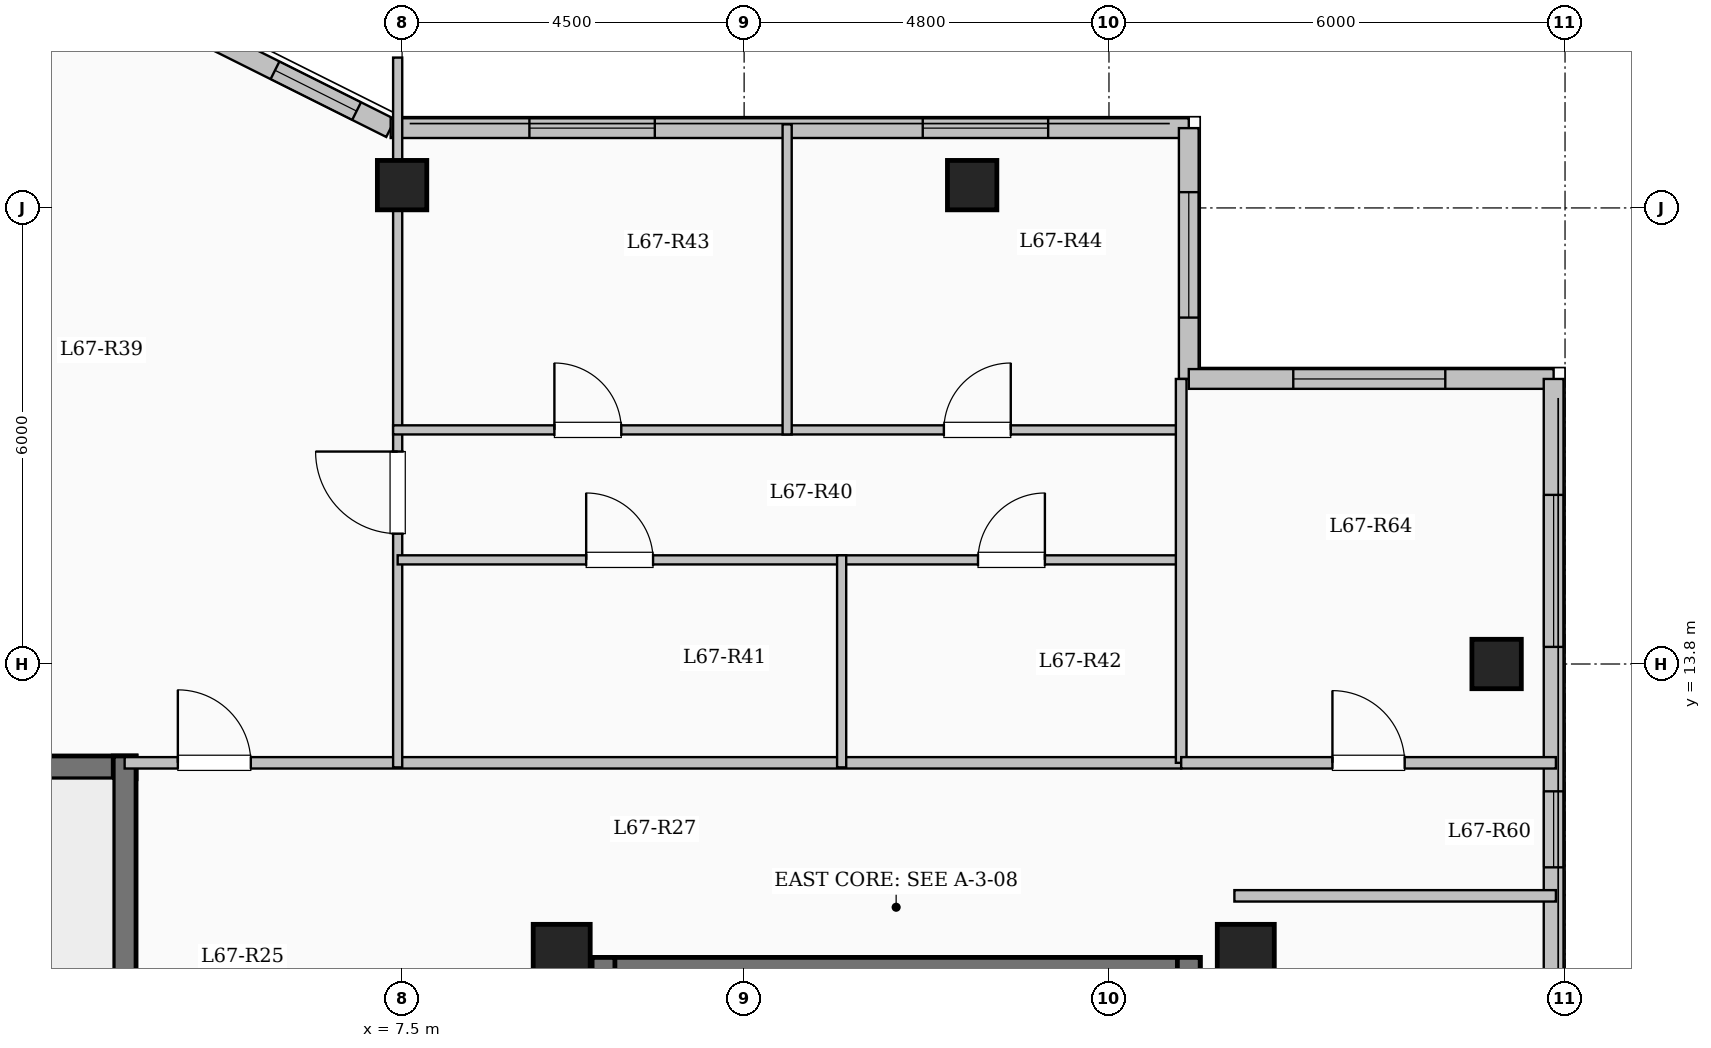
"""IFC4 building model, lengths in metres.
Left out: names, types, materials, properties, quantities, classifications, styles, units other than length and angle.
Written with IfcOpenShell. Run it as: python <this file> out.ifc"""

import sys

from ifc_helpers import new_model, si_unit, direction, frame, frame_2d, origin, origin_2d, place, context, subcontext, project, spatial, rectangle, extrude, element, fill, save


model = new_model("IFC4")
c1 = context("Model", 3, precision=1e-05, world=origin(), true_north=direction((0.0, 1.0)))
c2 = subcontext(c1, "Body", "Model", "MODEL_VIEW")
j1 = project(units=[si_unit("LENGTHUNIT", "METRE"), si_unit("PLANEANGLEUNIT", "RADIAN")], contexts=[c1])
p1 = place(None, origin())
s1 = spatial("IfcSite", under=j1, at=p1, CompositionType="ELEMENT")
p2 = place(p1, origin())
s2 = spatial("IfcBuilding", under=s1, at=p2, CompositionType="ELEMENT")
p3 = place(p2, frame((0.0, 0.0, 248.2)))
s3 = spatial("IfcBuildingStorey", under=s2, at=p3, CompositionType="ELEMENT", Elevation=248.2)
for number, where, z_axis, x_axis in (
    (1, (9.6, 10.0, 0.0), (0.0, 0.0, 1.0), (1.0, 0.0, 0.0)),
    (2, (18.6, 10.0, 0.0), (0.0, 0.0, 1.0), (1.0, 0.0, 0.0)),
):
    element("IfcColumn", number, at=place(p3, frame(where, z_axis=z_axis, x_axis=x_axis)), inside=s3, PredefinedType="COLUMN", context=c2, shape_type="SweptSolid", body=[
        extrude(rectangle(XDim=0.75, YDim=0.75, at=origin_2d()), origin(), (0.0, 0.0, 1.0), 3.35),
    ])
for number, where, z_axis, x_axis in (
    (3, (7.5, 20.1, 0.0), (0.0, 0.0, 1.0), (1.0, 0.0, 0.0)),
    (4, (15.0, 20.1, 0.0), (0.0, 0.0, 1.0), (1.0, 0.0, 0.0)),
    (5, (21.9, 13.8, 0.0), (0.0, 0.0, 1.0), (1.0, 0.0, 0.0)),
):
    element("IfcColumn", number, at=place(p3, frame(where, z_axis=z_axis, x_axis=x_axis)), inside=s3, PredefinedType="COLUMN", context=c2, shape_type="SweptSolid", body=[
        extrude(rectangle(XDim=0.65, YDim=0.65, at=origin_2d()), origin(), (0.0, 0.0, 1.0), 3.35),
    ])
p4 = place(p3, frame((4.35, 22.35, 0.0), z_axis=(0.0, 0.0, 1.0), x_axis=(0.894427191, -0.4472135955, 0.0)))
e6 = element("IfcWall", 6, at=p4, inside=s3, PredefinedType="SOLIDWALL", context=c2, shape_type="SweptSolid", body=[
    extrude(rectangle(XDim=3.354, YDim=0.26, at=frame_2d((1.677, 0.0))), origin(), (0.0, 0.0, 1.0), 3.1),
])
p5 = place(p4, frame((1.653, 0.0, 0.95)))
e7 = element("IfcOpeningElement", 7, at=p5, cuts=e6, PredefinedType="OPENING", context=c2, shape_type="SweptSolid", body=[
    extrude(rectangle(XDim=1.2, YDim=1.5, at=frame_2d((0.6, 0.75))), frame((0.0, 0.14, 0.0), z_axis=(0.0, -1.0, 0.0), x_axis=(1.0, 0.0, 0.0)), (0.0, 0.0, 1.0), 0.28),
])
p6 = place(p3, frame((7.35, 20.85, 0.0), z_axis=(0.0, 0.0, 1.0), x_axis=(1.0, 0.0, 0.0)))
e8 = element("IfcWall", 8, at=p6, inside=s3, PredefinedType="SOLIDWALL", context=c2, shape_type="SweptSolid", body=[
    extrude(rectangle(XDim=10.5, YDim=0.26, at=frame_2d((5.25, 0.0))), origin(), (0.0, 0.0, 1.0), 3.1),
])
p7 = place(p6, frame((1.825, 0.0, 0.9)))
e9 = element("IfcOpeningElement", 9, at=p7, cuts=e8, PredefinedType="OPENING", context=c2, shape_type="SweptSolid", body=[
    extrude(rectangle(XDim=1.65, YDim=1.6, at=frame_2d((0.825, 0.8))), frame((0.0, 0.14, 0.0), z_axis=(0.0, -1.0, 0.0), x_axis=(1.0, 0.0, 0.0)), (0.0, 0.0, 1.0), 0.28),
])
p8 = place(p6, frame((7.0, 0.0, 0.9)))
e10 = element("IfcOpeningElement", 10, at=p8, cuts=e8, PredefinedType="OPENING", context=c2, shape_type="SweptSolid", body=[
    extrude(rectangle(XDim=1.65, YDim=1.6, at=frame_2d((0.825, 0.8))), frame((0.0, 0.14, 0.0), z_axis=(0.0, -1.0, 0.0), x_axis=(1.0, 0.0, 0.0)), (0.0, 0.0, 1.0), 0.28),
])
p9 = place(p3, frame((17.85, 20.85, 0.0), z_axis=(0.0, 0.0, 1.0), x_axis=(0.0, -1.0, 0.0)))
e11 = element("IfcWall", 11, at=p9, inside=s3, PredefinedType="SOLIDWALL", context=c2, shape_type="SweptSolid", body=[
    extrude(rectangle(XDim=3.3, YDim=0.26, at=frame_2d((1.65, 0.0))), origin(), (0.0, 0.0, 1.0), 3.1),
])
p10 = place(p9, frame((0.843, 0.0, 0.9)))
e12 = element("IfcOpeningElement", 12, at=p10, cuts=e11, PredefinedType="OPENING", context=c2, shape_type="SweptSolid", body=[
    extrude(rectangle(XDim=1.65, YDim=1.6, at=frame_2d((0.825, 0.8))), frame((0.0, 0.14, 0.0), z_axis=(0.0, -1.0, 0.0), x_axis=(1.0, 0.0, 0.0)), (0.0, 0.0, 1.0), 0.28),
])
p11 = place(p3, frame((17.85, 17.55, 0.0), z_axis=(0.0, 0.0, 1.0), x_axis=(1.0, 0.0, 0.0)))
e13 = element("IfcWall", 13, at=p11, inside=s3, PredefinedType="SOLIDWALL", context=c2, shape_type="SweptSolid", body=[
    extrude(rectangle(XDim=4.8, YDim=0.26, at=frame_2d((2.4, 0.0))), origin(), (0.0, 0.0, 1.0), 3.1),
])
p12 = place(p11, frame((1.375, 0.0, 0.9)))
e14 = element("IfcOpeningElement", 14, at=p12, cuts=e13, PredefinedType="OPENING", context=c2, shape_type="SweptSolid", body=[
    extrude(rectangle(XDim=2.0, YDim=1.7, at=frame_2d((1.0, 0.85))), frame((0.0, 0.14, 0.0), z_axis=(0.0, -1.0, 0.0), x_axis=(1.0, 0.0, 0.0)), (0.0, 0.0, 1.0), 0.28),
])
p13 = place(p3, frame((22.65, 17.55, 0.0), z_axis=(0.0, 0.0, 1.0), x_axis=(0.0, -1.0, 0.0)))
e15 = element("IfcWall", 15, at=p13, inside=s3, PredefinedType="SOLIDWALL", context=c2, shape_type="SweptSolid", body=[
    extrude(rectangle(XDim=35.1, YDim=0.26, at=frame_2d((17.55, 0.0))), origin(), (0.0, 0.0, 1.0), 3.1),
])
p14 = place(p13, frame((1.525, 0.0, 0.9)))
e16 = element("IfcOpeningElement", 16, at=p14, cuts=e15, PredefinedType="OPENING", context=c2, shape_type="SweptSolid", body=[
    extrude(rectangle(XDim=2.0, YDim=1.7, at=frame_2d((1.0, 0.85))), frame((0.0, 0.14, 0.0), z_axis=(0.0, -1.0, 0.0), x_axis=(1.0, 0.0, 0.0)), (0.0, 0.0, 1.0), 0.28),
])
p15 = place(p13, frame((5.425, 0.0, 0.95)))
e17 = element("IfcOpeningElement", 17, at=p15, cuts=e15, PredefinedType="OPENING", context=c2, shape_type="SweptSolid", body=[
    extrude(rectangle(XDim=1.0, YDim=1.5, at=frame_2d((0.5, 0.75))), frame((0.0, 0.14, 0.0), z_axis=(0.0, -1.0, 0.0), x_axis=(1.0, 0.0, 0.0)), (0.0, 0.0, 1.0), 0.28),
])
p16 = place(p13, frame((14.8, 0.0, 0.9)))
e18 = element("IfcOpeningElement", 18, at=p16, cuts=e15, PredefinedType="OPENING", context=c2, shape_type="SweptSolid", body=[
    extrude(rectangle(XDim=2.0, YDim=1.7, at=frame_2d((1.0, 0.85))), frame((0.0, 0.14, 0.0), z_axis=(0.0, -1.0, 0.0), x_axis=(1.0, 0.0, 0.0)), (0.0, 0.0, 1.0), 0.28),
])
p17 = place(p13, frame((25.275, 0.0, 0.95)))
e19 = element("IfcOpeningElement", 19, at=p17, cuts=e15, PredefinedType="OPENING", context=c2, shape_type="SweptSolid", body=[
    extrude(rectangle(XDim=1.2, YDim=1.5, at=frame_2d((0.6, 0.75))), frame((0.0, 0.14, 0.0), z_axis=(0.0, -1.0, 0.0), x_axis=(1.0, 0.0, 0.0)), (0.0, 0.0, 1.0), 0.28),
])
p18 = place(p13, frame((29.925, 0.0, 0.9)))
e20 = element("IfcOpeningElement", 20, at=p18, cuts=e15, PredefinedType="OPENING", context=c2, shape_type="SweptSolid", body=[
    extrude(rectangle(XDim=2.2, YDim=1.75, at=frame_2d((1.1, 0.875))), frame((0.0, 0.14, 0.0), z_axis=(0.0, -1.0, 0.0), x_axis=(1.0, 0.0, 0.0)), (0.0, 0.0, 1.0), 0.28),
])
p19 = place(p3, frame((10.0, 9.79, 0.0), z_axis=(0.0, 0.0, 1.0), x_axis=(1.0, 0.0, 0.0)))
e21 = element("IfcWall", 21, at=p19, inside=s3, PredefinedType="SHEAR", context=c2, shape_type="SweptSolid", body=[
    extrude(rectangle(XDim=8.0, YDim=0.3, at=frame_2d((4.0, 0.0))), origin(), (0.0, 0.0, 1.0), 3.35),
])
for number, where, z_axis, x_axis in (
    (22, (10.15, 6.35, 0.0), (0.0, 0.0, 1.0), (0.0, 1.0, 0.0)),
    (23, (17.85, 6.35, 0.0), (0.0, 0.0, 1.0), (0.0, 1.0, 0.0)),
):
    element("IfcWall", number, at=place(p3, frame(where, z_axis=z_axis, x_axis=x_axis)), inside=s3, PredefinedType="SHEAR", context=c2, shape_type="SweptSolid", body=[
        extrude(rectangle(XDim=3.59, YDim=0.3, at=frame_2d((1.795, 0.0))), origin(), (0.0, 0.0, 1.0), 3.35),
    ])
p20 = place(p3, frame((-4.0, 12.44, 0.0), z_axis=(0.0, 0.0, 1.0), x_axis=(1.0, 0.0, 0.0)))
e24 = element("IfcWall", 24, at=p20, inside=s3, PredefinedType="SHEAR", context=c2, shape_type="SweptSolid", body=[
    extrude(rectangle(XDim=8.0, YDim=0.3, at=frame_2d((4.0, 0.0))), origin(), (0.0, 0.0, 1.0), 3.35),
])
p21 = place(p3, frame((3.85, 9.0, 0.0), z_axis=(0.0, 0.0, 1.0), x_axis=(0.0, 1.0, 0.0)))
e25 = element("IfcWall", 25, at=p21, inside=s3, PredefinedType="SHEAR", context=c2, shape_type="SweptSolid", body=[
    extrude(rectangle(XDim=3.59, YDim=0.3, at=frame_2d((1.795, 0.0))), origin(), (0.0, 0.0, 1.0), 3.35),
])
p22 = place(p3, frame((3.85, 12.5, 0.0), z_axis=(0.0, 0.0, 1.0), x_axis=(1.0, 0.0, 0.0)))
e26 = element("IfcWall", 26, at=p22, inside=s3, PredefinedType="PARTITIONING", context=c2, shape_type="SweptSolid", body=[
    extrude(rectangle(XDim=13.9, YDim=0.15, at=frame_2d((6.95, 0.0))), origin(), (0.0, 0.0, 1.0), 3.1),
])
p23 = place(p22, frame((0.7, 0.0, 0.0)))
e27 = element("IfcOpeningElement", 27, at=p23, cuts=e26, PredefinedType="OPENING", context=c2, shape_type="SweptSolid", body=[
    extrude(rectangle(XDim=0.96, YDim=2.15, at=frame_2d((0.48, 1.075))), frame((0.0, 0.085, 0.0), z_axis=(0.0, -1.0, 0.0), x_axis=(1.0, 0.0, 0.0)), (0.0, 0.0, 1.0), 0.17),
])
p24 = place(p3, frame((7.442, 12.44, 0.0), z_axis=(0.0, 0.0, 1.0), x_axis=(0.0, 1.0, 0.0)))
e28 = element("IfcWall", 28, at=p24, inside=s3, PredefinedType="PARTITIONING", context=c2, shape_type="SweptSolid", body=[
    extrude(rectangle(XDim=9.338, YDim=0.12, at=frame_2d((4.669, 0.0))), origin(), (0.0, 0.0, 1.0), 2.685),
])
p25 = place(p24, frame((3.075, 0.0, 0.0)))
e29 = element("IfcOpeningElement", 29, at=p25, cuts=e28, PredefinedType="OPENING", context=c2, shape_type="SweptSolid", body=[
    extrude(rectangle(XDim=1.08, YDim=2.15, at=frame_2d((0.54, 1.075))), frame((0.0, 0.07, 0.0), z_axis=(0.0, -1.0, 0.0), x_axis=(1.0, 0.0, 0.0)), (0.0, 0.0, 1.0), 0.14),
])
p26 = place(p3, frame((7.442, 15.17, 0.0), z_axis=(0.0, 0.0, 1.0), x_axis=(1.0, 0.0, 0.0)))
e30 = element("IfcWall", 30, at=p26, inside=s3, PredefinedType="PARTITIONING", context=c2, shape_type="SweptSolid", body=[
    extrude(rectangle(XDim=5.841, YDim=0.12, at=frame_2d((2.92, 0.0))), origin(), (0.0, 0.0, 1.0), 3.1),
])
p27 = place(p26, frame((2.48, 0.0, 0.0)))
e31 = element("IfcOpeningElement", 31, at=p27, cuts=e30, PredefinedType="OPENING", context=c2, shape_type="SweptSolid", body=[
    extrude(rectangle(XDim=0.88, YDim=2.1, at=frame_2d((0.44, 1.05))), frame((0.0, 0.07, 0.0), z_axis=(0.0, -1.0, 0.0), x_axis=(1.0, 0.0, 0.0)), (0.0, 0.0, 1.0), 0.14),
])
p28 = place(p3, frame((13.283, 15.17, 0.0), z_axis=(0.0, 0.0, 1.0), x_axis=(1.0, 0.0, 0.0)))
e32 = element("IfcWall", 32, at=p28, inside=s3, PredefinedType="PARTITIONING", context=c2, shape_type="SweptSolid", body=[
    extrude(rectangle(XDim=4.467, YDim=0.12, at=frame_2d((2.233, 0.0))), origin(), (0.0, 0.0, 1.0), 3.1),
])
p29 = place(p28, frame((1.794, 0.0, 0.0)))
e33 = element("IfcOpeningElement", 33, at=p29, cuts=e32, PredefinedType="OPENING", context=c2, shape_type="SweptSolid", body=[
    extrude(rectangle(XDim=0.88, YDim=2.1, at=frame_2d((0.44, 1.05))), frame((0.0, 0.07, 0.0), z_axis=(0.0, -1.0, 0.0), x_axis=(1.0, 0.0, 0.0)), (0.0, 0.0, 1.0), 0.14),
])
p30 = place(p3, frame((7.382, 16.88, 0.0), z_axis=(0.0, 0.0, 1.0), x_axis=(1.0, 0.0, 0.0)))
e34 = element("IfcWall", 34, at=p30, inside=s3, PredefinedType="PARTITIONING", context=c2, shape_type="SweptSolid", body=[
    extrude(rectangle(XDim=10.428, YDim=0.12, at=frame_2d((5.214, 0.0))), origin(), (0.0, 0.0, 1.0), 2.785),
])
p31 = place(p30, frame((2.122, 0.0, 0.0)))
e35 = element("IfcOpeningElement", 35, at=p31, cuts=e34, PredefinedType="OPENING", context=c2, shape_type="SweptSolid", body=[
    extrude(rectangle(XDim=0.88, YDim=2.1, at=frame_2d((0.44, 1.05))), frame((0.0, 0.07, 0.0), z_axis=(0.0, -1.0, 0.0), x_axis=(1.0, 0.0, 0.0)), (0.0, 0.0, 1.0), 0.14),
])
p32 = place(p30, frame((7.246, 0.0, 0.0)))
e36 = element("IfcOpeningElement", 36, at=p32, cuts=e34, PredefinedType="OPENING", context=c2, shape_type="SweptSolid", body=[
    extrude(rectangle(XDim=0.88, YDim=2.1, at=frame_2d((0.44, 1.05))), frame((0.0, 0.07, 0.0), z_axis=(0.0, -1.0, 0.0), x_axis=(1.0, 0.0, 0.0)), (0.0, 0.0, 1.0), 0.14),
])
p33 = place(p3, frame((13.283, 12.44, 0.0), z_axis=(0.0, 0.0, 1.0), x_axis=(0.0, 1.0, 0.0)))
e37 = element("IfcWall", 37, at=p33, inside=s3, PredefinedType="PARTITIONING", context=c2, shape_type="SweptSolid", body=[
    extrude(rectangle(XDim=2.79, YDim=0.12, at=frame_2d((1.395, 0.0))), origin(), (0.0, 0.0, 1.0), 3.1),
])
p34 = place(p3, frame((12.566, 16.82, 0.0), z_axis=(0.0, 0.0, 1.0), x_axis=(0.0, 1.0, 0.0)))
e38 = element("IfcWall", 38, at=p34, inside=s3, PredefinedType="PARTITIONING", context=c2, shape_type="SweptSolid", body=[
    extrude(rectangle(XDim=4.08, YDim=0.12, at=frame_2d((2.04, 0.0))), origin(), (0.0, 0.0, 1.0), 3.1),
])
p35 = place(p3, frame((18.45, 10.75, 0.0), z_axis=(0.0, 0.0, 1.0), x_axis=(1.0, 0.0, 0.0)))
e39 = element("IfcWall", 39, at=p35, inside=s3, PredefinedType="PARTITIONING", context=c2, shape_type="SweptSolid", body=[
    extrude(rectangle(XDim=4.23, YDim=0.15, at=frame_2d((2.115, 0.0))), origin(), (0.0, 0.0, 1.0), 3.1),
])
p36 = place(p3, frame((17.75, 12.5, 0.0), z_axis=(0.0, 0.0, 1.0), x_axis=(0.0, 1.0, 0.0)))
e40 = element("IfcWall", 40, at=p36, inside=s3, PredefinedType="PARTITIONING", context=c2, shape_type="SweptSolid", body=[
    extrude(rectangle(XDim=5.05, YDim=0.14, at=frame_2d((2.525, 0.0))), origin(), (0.0, 0.0, 1.0), 3.1),
])
p37 = place(p3, frame((17.75, 12.5, 0.0), z_axis=(0.0, 0.0, 1.0), x_axis=(1.0, 0.0, 0.0)))
e41 = element("IfcWall", 41, at=p37, inside=s3, PredefinedType="PARTITIONING", context=c2, shape_type="SweptSolid", body=[
    extrude(rectangle(XDim=4.93, YDim=0.15, at=frame_2d((2.465, 0.0))), origin(), (0.0, 0.0, 1.0), 3.1),
])
p38 = place(p37, frame((1.99, 0.0, 0.0)))
e42 = element("IfcOpeningElement", 42, at=p38, cuts=e41, PredefinedType="OPENING", context=c2, shape_type="SweptSolid", body=[
    extrude(rectangle(XDim=0.95, YDim=2.15, at=frame_2d((0.475, 1.075))), frame((0.0, 0.085, 0.0), z_axis=(0.0, -1.0, 0.0), x_axis=(1.0, 0.0, 0.0)), (0.0, 0.0, 1.0), 0.17),
])
p39 = place(p5, origin())
e43 = element("IfcWindow", 43, at=p39, inside=s3, PartitioningType="SINGLE_PANEL", PredefinedType="WINDOW", context=c2, shape_type="SweptSolid", body=[
    extrude(rectangle(XDim=1.2, YDim=1.5, at=frame_2d((0.6, 0.75))), frame((0.0, 0.03, 0.0), z_axis=(0.0, -1.0, 0.0), x_axis=(1.0, 0.0, 0.0)), (0.0, 0.0, 1.0), 0.06),
])
fill(e7, e43)
p40 = place(p7, origin())
e44 = element("IfcWindow", 44, at=p40, inside=s3, PartitioningType="SINGLE_PANEL", PredefinedType="WINDOW", context=c2, shape_type="SweptSolid", body=[
    extrude(rectangle(XDim=1.65, YDim=1.6, at=frame_2d((0.825, 0.8))), frame((0.0, 0.03, 0.0), z_axis=(0.0, -1.0, 0.0), x_axis=(1.0, 0.0, 0.0)), (0.0, 0.0, 1.0), 0.06),
])
fill(e9, e44)
p41 = place(p8, origin())
e45 = element("IfcWindow", 45, at=p41, inside=s3, PartitioningType="SINGLE_PANEL", PredefinedType="WINDOW", context=c2, shape_type="SweptSolid", body=[
    extrude(rectangle(XDim=1.65, YDim=1.6, at=frame_2d((0.825, 0.8))), frame((0.0, 0.03, 0.0), z_axis=(0.0, -1.0, 0.0), x_axis=(1.0, 0.0, 0.0)), (0.0, 0.0, 1.0), 0.06),
])
fill(e10, e45)
p42 = place(p10, origin())
e46 = element("IfcWindow", 46, at=p42, inside=s3, PartitioningType="SINGLE_PANEL", PredefinedType="WINDOW", context=c2, shape_type="SweptSolid", body=[
    extrude(rectangle(XDim=1.65, YDim=1.6, at=frame_2d((0.825, 0.8))), frame((0.0, 0.03, 0.0), z_axis=(0.0, -1.0, 0.0), x_axis=(1.0, 0.0, 0.0)), (0.0, 0.0, 1.0), 0.06),
])
fill(e12, e46)
p43 = place(p12, origin())
e47 = element("IfcWindow", 47, at=p43, inside=s3, PartitioningType="SINGLE_PANEL", PredefinedType="WINDOW", context=c2, shape_type="SweptSolid", body=[
    extrude(rectangle(XDim=2.0, YDim=1.7, at=frame_2d((1.0, 0.85))), frame((0.0, 0.03, 0.0), z_axis=(0.0, -1.0, 0.0), x_axis=(1.0, 0.0, 0.0)), (0.0, 0.0, 1.0), 0.06),
])
fill(e14, e47)
p44 = place(p14, origin())
e48 = element("IfcWindow", 48, at=p44, inside=s3, PartitioningType="SINGLE_PANEL", PredefinedType="WINDOW", context=c2, shape_type="SweptSolid", body=[
    extrude(rectangle(XDim=2.0, YDim=1.7, at=frame_2d((1.0, 0.85))), frame((0.0, 0.03, 0.0), z_axis=(0.0, -1.0, 0.0), x_axis=(1.0, 0.0, 0.0)), (0.0, 0.0, 1.0), 0.06),
])
fill(e16, e48)
p45 = place(p15, origin())
e49 = element("IfcWindow", 49, at=p45, inside=s3, PartitioningType="SINGLE_PANEL", PredefinedType="WINDOW", context=c2, shape_type="SweptSolid", body=[
    extrude(rectangle(XDim=1.0, YDim=1.5, at=frame_2d((0.5, 0.75))), frame((0.0, 0.03, 0.0), z_axis=(0.0, -1.0, 0.0), x_axis=(1.0, 0.0, 0.0)), (0.0, 0.0, 1.0), 0.06),
])
fill(e17, e49)
p46 = place(p23, origin())
e50 = element("IfcDoor", 50, at=p46, inside=s3, OperationType="SINGLE_SWING_LEFT", PredefinedType="DOOR", context=c2, shape_type="SweptSolid", body=[
    extrude(rectangle(XDim=0.96, YDim=2.15, at=frame_2d((0.48, 1.075))), frame((0.0, 0.025, 0.0), z_axis=(0.0, -1.0, 0.0), x_axis=(1.0, 0.0, 0.0)), (0.0, 0.0, 1.0), 0.05),
])
fill(e27, e50)
p47 = place(p25, origin())
e51 = element("IfcDoor", 51, at=p47, inside=s3, OperationType="SINGLE_SWING_RIGHT", PredefinedType="DOOR", context=c2, shape_type="SweptSolid", body=[
    extrude(rectangle(XDim=1.08, YDim=2.15, at=frame_2d((0.54, 1.075))), frame((0.0, 0.025, 0.0), z_axis=(0.0, -1.0, 0.0), x_axis=(1.0, 0.0, 0.0)), (0.0, 0.0, 1.0), 0.05),
])
fill(e29, e51)
p48 = place(p27, origin())
e52 = element("IfcDoor", 52, at=p48, inside=s3, OperationType="SINGLE_SWING_LEFT", PredefinedType="DOOR", context=c2, shape_type="SweptSolid", body=[
    extrude(rectangle(XDim=0.88, YDim=2.1, at=frame_2d((0.44, 1.05))), frame((0.0, 0.025, 0.0), z_axis=(0.0, -1.0, 0.0), x_axis=(1.0, 0.0, 0.0)), (0.0, 0.0, 1.0), 0.05),
])
fill(e31, e52)
p49 = place(p29, origin())
e53 = element("IfcDoor", 53, at=p49, inside=s3, OperationType="SINGLE_SWING_RIGHT", PredefinedType="DOOR", context=c2, shape_type="SweptSolid", body=[
    extrude(rectangle(XDim=0.88, YDim=2.1, at=frame_2d((0.44, 1.05))), frame((0.0, 0.025, 0.0), z_axis=(0.0, -1.0, 0.0), x_axis=(1.0, 0.0, 0.0)), (0.0, 0.0, 1.0), 0.05),
])
fill(e33, e53)
p50 = place(p31, origin())
e54 = element("IfcDoor", 54, at=p50, inside=s3, OperationType="SINGLE_SWING_LEFT", PredefinedType="DOOR", context=c2, shape_type="SweptSolid", body=[
    extrude(rectangle(XDim=0.88, YDim=2.1, at=frame_2d((0.44, 1.05))), frame((0.0, 0.025, 0.0), z_axis=(0.0, -1.0, 0.0), x_axis=(1.0, 0.0, 0.0)), (0.0, 0.0, 1.0), 0.05),
])
fill(e35, e54)
p51 = place(p32, origin())
e55 = element("IfcDoor", 55, at=p51, inside=s3, OperationType="SINGLE_SWING_RIGHT", PredefinedType="DOOR", context=c2, shape_type="SweptSolid", body=[
    extrude(rectangle(XDim=0.88, YDim=2.1, at=frame_2d((0.44, 1.05))), frame((0.0, 0.025, 0.0), z_axis=(0.0, -1.0, 0.0), x_axis=(1.0, 0.0, 0.0)), (0.0, 0.0, 1.0), 0.05),
])
fill(e36, e55)
p52 = place(p38, origin())
e56 = element("IfcDoor", 56, at=p52, inside=s3, OperationType="SINGLE_SWING_LEFT", PredefinedType="DOOR", context=c2, shape_type="SweptSolid", body=[
    extrude(rectangle(XDim=0.95, YDim=2.15, at=frame_2d((0.475, 1.075))), frame((0.0, 0.025, 0.0), z_axis=(0.0, -1.0, 0.0), x_axis=(1.0, 0.0, 0.0)), (0.0, 0.0, 1.0), 0.05),
])
fill(e42, e56)
save(model, sys.argv[1])
